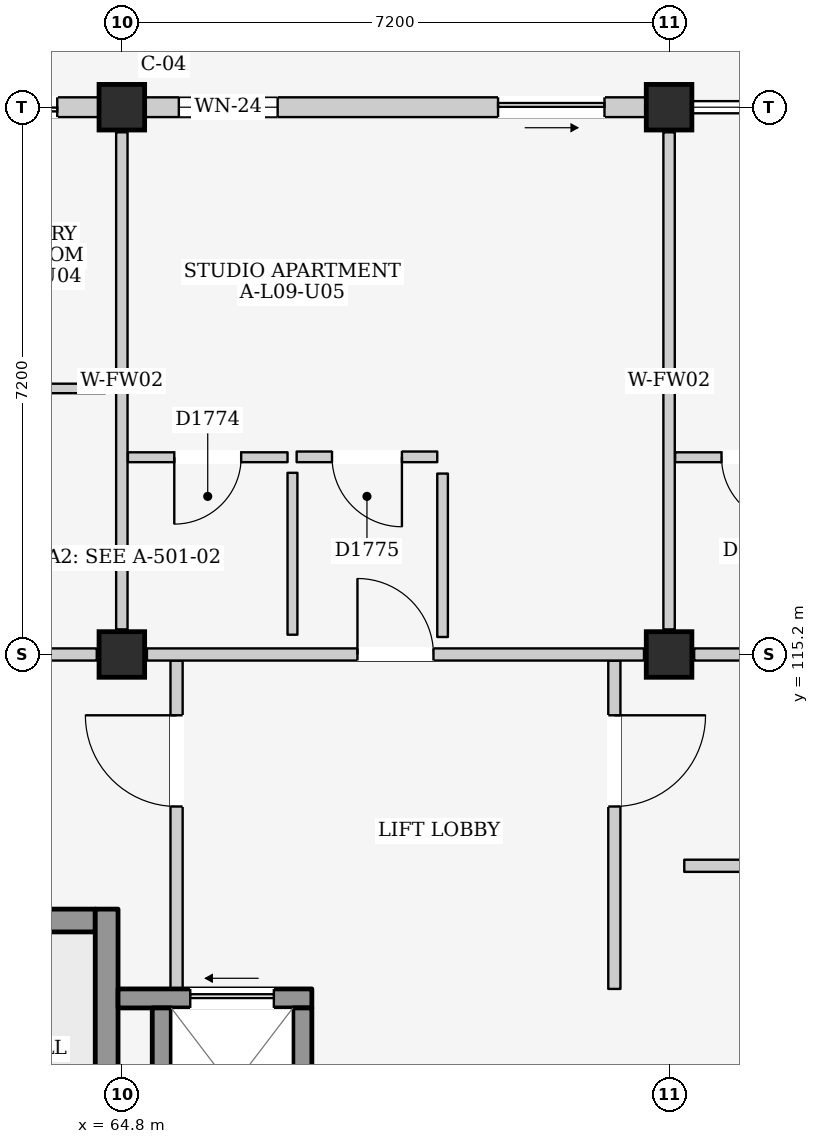
"""IFC4 building model, lengths in metres.
Left out: names, types, materials, properties, quantities, classifications, styles, units other than length and angle.
Written with IfcOpenShell. Run it as: python <this file> out.ifc"""

import sys

from ifc_helpers import new_model, si_unit, direction, frame, frame_2d, origin, origin_2d, place, context, subcontext, project, spatial, rectangle, extrude, element, fill, save


model = new_model("IFC4")
c1 = context("Model", 3, precision=1e-05, world=origin(), true_north=direction((0.0, 1.0)))
c2 = subcontext(c1, "Body", "Model", "MODEL_VIEW")
j1 = project(units=[si_unit("LENGTHUNIT", "METRE"), si_unit("PLANEANGLEUNIT", "RADIAN")], contexts=[c1])
p1 = place(None, origin())
s1 = spatial("IfcSite", under=j1, at=p1, CompositionType="ELEMENT")
p2 = place(p1, origin())
s2 = spatial("IfcBuilding", under=s1, at=p2, CompositionType="ELEMENT")
p3 = place(p2, frame((0.0, 0.0, 31.5)))
s3 = spatial("IfcBuildingStorey", under=s2, at=p3, CompositionType="ELEMENT", Elevation=31.5)
for number, where, z_axis, x_axis in (
    (1, (64.8, 115.2, 0.0), (0.0, 0.0, 1.0), (1.0, 0.0, 0.0)),
    (2, (64.8, 122.4, 0.0), (0.0, 0.0, 1.0), (1.0, 0.0, 0.0)),
    (3, (72.0, 115.2, 0.0), (0.0, 0.0, 1.0), (1.0, 0.0, 0.0)),
    (4, (72.0, 122.4, 0.0), (0.0, 0.0, 1.0), (1.0, 0.0, 0.0)),
):
    element("IfcColumn", number, at=place(p3, frame(where, z_axis=z_axis, x_axis=x_axis)), inside=s3, PredefinedType="COLUMN", context=c2, shape_type="SweptSolid", body=[
        extrude(rectangle(XDim=0.6, YDim=0.6, at=origin_2d()), origin(), (0.0, 0.0, 1.0), 3.3),
    ])
p4 = place(p3, frame((57.9, 122.4, 0.0), z_axis=(0.0, 0.0, 1.0), x_axis=(1.0, 0.0, 0.0)))
e5 = element("IfcWall", 5, at=p4, inside=s3, PredefinedType="ELEMENTEDWALL", context=c2, shape_type="SweptSolid", body=[
    extrude(rectangle(XDim=6.6, YDim=0.26, at=frame_2d((3.3, 0.0))), origin(), (0.0, 0.0, 1.0), 2.615),
])
p5 = place(p4, frame((4.05, 0.0, 0.0)))
e6 = element("IfcOpeningElement", 6, at=p5, cuts=e5, PredefinedType="OPENING", context=c2, shape_type="SweptSolid", body=[
    extrude(rectangle(XDim=2.0, YDim=2.12, at=frame_2d((1.0, 1.06))), frame((0.0, 0.145, 0.0), z_axis=(0.0, -1.0, 0.0), x_axis=(1.0, 0.0, 0.0)), (0.0, 0.0, 1.0), 0.29),
])
p6 = place(p4, frame((0.45, 0.0, 0.9)))
e7 = element("IfcOpeningElement", 7, at=p6, cuts=e5, PredefinedType="OPENING", context=c2, shape_type="SweptSolid", body=[
    extrude(rectangle(XDim=1.85, YDim=1.4, at=frame_2d((0.925, 0.7))), frame((0.0, 0.145, 0.0), z_axis=(0.0, -1.0, 0.0), x_axis=(1.0, 0.0, 0.0)), (0.0, 0.0, 1.0), 0.29),
])
p7 = place(p3, frame((65.1, 122.4, 0.0), z_axis=(0.0, 0.0, 1.0), x_axis=(1.0, 0.0, 0.0)))
e8 = element("IfcWall", 8, at=p7, inside=s3, PredefinedType="ELEMENTEDWALL", context=c2, shape_type="SweptSolid", body=[
    extrude(rectangle(XDim=6.6, YDim=0.26, at=frame_2d((3.3, 0.0))), origin(), (0.0, 0.0, 1.0), 2.615),
])
p8 = place(p7, frame((4.65, 0.0, 0.0)))
e9 = element("IfcOpeningElement", 9, at=p8, cuts=e8, PredefinedType="OPENING", context=c2, shape_type="SweptSolid", body=[
    extrude(rectangle(XDim=1.4, YDim=2.1, at=frame_2d((0.7, 1.05))), frame((0.0, 0.145, 0.0), z_axis=(0.0, -1.0, 0.0), x_axis=(1.0, 0.0, 0.0)), (0.0, 0.0, 1.0), 0.29),
])
p9 = place(p7, frame((0.45, 0.0, 0.9)))
e10 = element("IfcOpeningElement", 10, at=p9, cuts=e8, PredefinedType="OPENING", context=c2, shape_type="SweptSolid", body=[
    extrude(rectangle(XDim=1.3, YDim=1.25, at=frame_2d((0.65, 0.625))), frame((0.0, 0.145, 0.0), z_axis=(0.0, -1.0, 0.0), x_axis=(1.0, 0.0, 0.0)), (0.0, 0.0, 1.0), 0.29),
])
p10 = place(p3, frame((57.95, 111.7, 0.0), z_axis=(0.0, 0.0, 1.0), x_axis=(1.0, 0.0, 0.0)))
e11 = element("IfcWall", 11, at=p10, inside=s3, PredefinedType="SHEAR", context=c2, shape_type="SweptSolid", body=[
    extrude(rectangle(XDim=6.5, YDim=0.3, at=frame_2d((3.25, 0.0))), origin(), (0.0, 0.0, 1.0), 3.08),
])
p11 = place(p10, frame((0.18, 0.0, 0.0)))
e12 = element("IfcOpeningElement", 12, at=p11, cuts=e11, PredefinedType="OPENING", context=c2, shape_type="SweptSolid", body=[
    extrude(rectangle(XDim=1.15, YDim=2.2, at=frame_2d((0.575, 1.1))), frame((0.0, 0.165, 0.0), z_axis=(0.0, -1.0, 0.0), x_axis=(1.0, 0.0, 0.0)), (0.0, 0.0, 1.0), 0.33),
])
p12 = place(p3, frame((64.6, 108.15, 0.0), z_axis=(0.0, 0.0, 1.0), x_axis=(0.0, 1.0, 0.0)))
e13 = element("IfcWall", 13, at=p12, inside=s3, PredefinedType="SHEAR", context=c2, shape_type="SweptSolid", body=[
    extrude(rectangle(XDim=3.7, YDim=0.3, at=frame_2d((1.85, 0.0))), origin(), (0.0, 0.0, 1.0), 3.08),
])
p13 = place(p3, frame((65.52, 110.8, 0.0), z_axis=(0.0, 0.0, 1.0), x_axis=(0.0, 1.0, 0.0)))
e14 = element("IfcWall", 14, at=p13, inside=s3, PredefinedType="PARTITIONING", context=c2, shape_type="SweptSolid", body=[
    extrude(rectangle(XDim=4.32, YDim=0.16, at=frame_2d((2.16, 0.0))), origin(), (0.0, 0.0, 1.0), 3.08),
])
p14 = place(p13, frame((2.4, 0.0, 0.0)))
e15 = element("IfcOpeningElement", 15, at=p14, cuts=e14, PredefinedType="OPENING", context=c2, shape_type="SweptSolid", body=[
    extrude(rectangle(XDim=1.2, YDim=2.2, at=frame_2d((0.6, 1.1))), frame((0.0, 0.095, 0.0), z_axis=(0.0, -1.0, 0.0), x_axis=(1.0, 0.0, 0.0)), (0.0, 0.0, 1.0), 0.19),
])
p15 = place(p3, frame((71.28, 110.8, 0.0), z_axis=(0.0, 0.0, 1.0), x_axis=(0.0, 1.0, 0.0)))
e16 = element("IfcWall", 16, at=p15, inside=s3, PredefinedType="PARTITIONING", context=c2, shape_type="SweptSolid", body=[
    extrude(rectangle(XDim=4.32, YDim=0.16, at=frame_2d((2.16, 0.0))), origin(), (0.0, 0.0, 1.0), 3.08),
])
p16 = place(p15, frame((2.4, 0.0, 0.0)))
e17 = element("IfcOpeningElement", 17, at=p16, cuts=e16, PredefinedType="OPENING", context=c2, shape_type="SweptSolid", body=[
    extrude(rectangle(XDim=1.2, YDim=2.2, at=frame_2d((0.6, 1.1))), frame((0.0, 0.095, 0.0), z_axis=(0.0, -1.0, 0.0), x_axis=(1.0, 0.0, 0.0)), (0.0, 0.0, 1.0), 0.19),
])
p17 = place(p3, frame((64.75, 110.675, 0.0), z_axis=(0.0, 0.0, 1.0), x_axis=(1.0, 0.0, 0.0)))
e18 = element("IfcWall", 18, at=p17, inside=s3, PredefinedType="SHEAR", context=c2, shape_type="SweptSolid", body=[
    extrude(rectangle(XDim=2.55, YDim=0.25, at=frame_2d((1.275, 0.0))), origin(), (0.0, 0.0, 1.0), 3.08),
])
p18 = place(p17, frame((0.95, 0.0, 0.0)))
e19 = element("IfcOpeningElement", 19, at=p18, cuts=e18, PredefinedType="OPENING", context=c2, shape_type="SweptSolid", body=[
    extrude(rectangle(XDim=1.1, YDim=2.15, at=frame_2d((0.55, 1.075))), frame((0.0, 0.14, 0.0), z_axis=(0.0, -1.0, 0.0), x_axis=(1.0, 0.0, 0.0)), (0.0, 0.0, 1.0), 0.28),
])
for number, where, z_axis, x_axis in (
    (20, (65.325, 108.45, 0.0), (0.0, 0.0, 1.0), (0.0, 1.0, 0.0)),
    (21, (67.175, 108.45, 0.0), (0.0, 0.0, 1.0), (0.0, 1.0, 0.0)),
):
    element("IfcWall", number, at=place(p3, frame(where, z_axis=z_axis, x_axis=x_axis)), inside=s3, PredefinedType="SHEAR", context=c2, shape_type="SweptSolid", body=[
        extrude(rectangle(XDim=2.1, YDim=0.25, at=frame_2d((1.05, 0.0))), origin(), (0.0, 0.0, 1.0), 3.08),
    ])
p19 = place(p3, frame((57.93, 115.2, 0.0), z_axis=(0.0, 0.0, 1.0), x_axis=(1.0, 0.0, 0.0)))
e22 = element("IfcWall", 22, at=p19, inside=s3, PredefinedType="PARTITIONING", context=c2, shape_type="SweptSolid", body=[
    extrude(rectangle(XDim=6.54, YDim=0.16, at=frame_2d((3.27, 0.0))), origin(), (0.0, 0.0, 1.0), 2.415),
])
p20 = place(p19, frame((2.77, 0.0, 0.0)))
e23 = element("IfcOpeningElement", 23, at=p20, cuts=e22, PredefinedType="OPENING", context=c2, shape_type="SweptSolid", body=[
    extrude(rectangle(XDim=1.0, YDim=2.15, at=frame_2d((0.5, 1.075))), frame((0.0, 0.095, 0.0), z_axis=(0.0, -1.0, 0.0), x_axis=(1.0, 0.0, 0.0)), (0.0, 0.0, 1.0), 0.19),
])
p21 = place(p3, frame((64.8, 115.53, 0.0), z_axis=(0.0, 0.0, 1.0), x_axis=(0.0, 1.0, 0.0)))
e24 = element("IfcWall", 24, at=p21, inside=s3, PredefinedType="PARTITIONING", context=c2, shape_type="SweptSolid", body=[
    extrude(rectangle(XDim=6.54, YDim=0.15, at=frame_2d((3.27, 0.0))), origin(), (0.0, 0.0, 1.0), 2.565),
])
p22 = place(p3, frame((61.52, 118.7, 0.0), z_axis=(0.0, 0.0, 1.0), x_axis=(1.0, 0.0, 0.0)))
e25 = element("IfcWall", 25, at=p22, inside=s3, PredefinedType="PARTITIONING", context=c2, shape_type="SweptSolid", body=[
    extrude(rectangle(XDim=3.06, YDim=0.125, at=frame_2d((1.53, 0.0))), origin(), (0.0, 0.0, 1.0), 3.08),
])
p23 = place(p3, frame((65.13, 115.2, 0.0), z_axis=(0.0, 0.0, 1.0), x_axis=(1.0, 0.0, 0.0)))
e26 = element("IfcWall", 26, at=p23, inside=s3, PredefinedType="PARTITIONING", context=c2, shape_type="SweptSolid", body=[
    extrude(rectangle(XDim=6.54, YDim=0.16, at=frame_2d((3.27, 0.0))), origin(), (0.0, 0.0, 1.0), 2.415),
])
p24 = place(p23, frame((2.77, 0.0, 0.0)))
e27 = element("IfcOpeningElement", 27, at=p24, cuts=e26, PredefinedType="OPENING", context=c2, shape_type="SweptSolid", body=[
    extrude(rectangle(XDim=1.0, YDim=2.15, at=frame_2d((0.5, 1.075))), frame((0.0, 0.095, 0.0), z_axis=(0.0, -1.0, 0.0), x_axis=(1.0, 0.0, 0.0)), (0.0, 0.0, 1.0), 0.19),
])
p25 = place(p3, frame((72.0, 115.53, 0.0), z_axis=(0.0, 0.0, 1.0), x_axis=(0.0, 1.0, 0.0)))
e28 = element("IfcWall", 28, at=p25, inside=s3, PredefinedType="PARTITIONING", context=c2, shape_type="SweptSolid", body=[
    extrude(rectangle(XDim=6.54, YDim=0.15, at=frame_2d((3.27, 0.0))), origin(), (0.0, 0.0, 1.0), 2.565),
])
p26 = place(p3, frame((64.88, 117.795, 0.0), z_axis=(0.0, 0.0, 1.0), x_axis=(1.0, 0.0, 0.0)))
e29 = element("IfcWall", 29, at=p26, inside=s3, PredefinedType="PARTITIONING", context=c2, shape_type="SweptSolid", body=[
    extrude(rectangle(XDim=2.1, YDim=0.13, at=frame_2d((1.05, 0.0))), origin(), (0.0, 0.0, 1.0), 3.08),
])
p27 = place(p26, frame((0.61, 0.0, 0.0)))
e30 = element("IfcOpeningElement", 30, at=p27, cuts=e29, PredefinedType="OPENING", context=c2, shape_type="SweptSolid", body=[
    extrude(rectangle(XDim=0.88, YDim=2.1, at=frame_2d((0.44, 1.05))), frame((0.0, 0.08, 0.0), z_axis=(0.0, -1.0, 0.0), x_axis=(1.0, 0.0, 0.0)), (0.0, 0.0, 1.0), 0.16),
])
p28 = place(p3, frame((67.045, 115.46, 0.0), z_axis=(0.0, 0.0, 1.0), x_axis=(0.0, 1.0, 0.0)))
e31 = element("IfcWall", 31, at=p28, inside=s3, PredefinedType="PARTITIONING", context=c2, shape_type="SweptSolid", body=[
    extrude(rectangle(XDim=2.13, YDim=0.13, at=frame_2d((1.065, 0.0))), origin(), (0.0, 0.0, 1.0), 3.08),
])
p29 = place(p3, frame((67.1, 117.8, 0.0), z_axis=(0.0, 0.0, 1.0), x_axis=(1.0, 0.0, 0.0)))
e32 = element("IfcWall", 32, at=p29, inside=s3, PredefinedType="PARTITIONING", context=c2, shape_type="SweptSolid", body=[
    extrude(rectangle(XDim=1.85, YDim=0.14, at=frame_2d((0.925, 0.0))), origin(), (0.0, 0.0, 1.0), 3.08),
])
p30 = place(p29, frame((0.465, 0.0, 0.0)))
e33 = element("IfcOpeningElement", 33, at=p30, cuts=e32, PredefinedType="OPENING", context=c2, shape_type="SweptSolid", body=[
    extrude(rectangle(XDim=0.92, YDim=2.1, at=frame_2d((0.46, 1.05))), frame((0.0, 0.085, 0.0), z_axis=(0.0, -1.0, 0.0), x_axis=(1.0, 0.0, 0.0)), (0.0, 0.0, 1.0), 0.17),
])
p31 = place(p3, frame((69.02, 115.43, 0.0), z_axis=(0.0, 0.0, 1.0), x_axis=(0.0, 1.0, 0.0)))
e34 = element("IfcWall", 34, at=p31, inside=s3, PredefinedType="PARTITIONING", context=c2, shape_type="SweptSolid", body=[
    extrude(rectangle(XDim=2.15, YDim=0.14, at=frame_2d((1.075, 0.0))), origin(), (0.0, 0.0, 1.0), 3.08),
])
p32 = place(p3, frame((72.33, 115.2, 0.0), z_axis=(0.0, 0.0, 1.0), x_axis=(1.0, 0.0, 0.0)))
e35 = element("IfcWall", 35, at=p32, inside=s3, PredefinedType="PARTITIONING", context=c2, shape_type="SweptSolid", body=[
    extrude(rectangle(XDim=6.54, YDim=0.16, at=frame_2d((3.27, 0.0))), origin(), (0.0, 0.0, 1.0), 2.415),
])
p33 = place(p32, frame((2.77, 0.0, 0.0)))
e36 = element("IfcOpeningElement", 36, at=p33, cuts=e35, PredefinedType="OPENING", context=c2, shape_type="SweptSolid", body=[
    extrude(rectangle(XDim=1.0, YDim=2.15, at=frame_2d((0.5, 1.075))), frame((0.0, 0.095, 0.0), z_axis=(0.0, -1.0, 0.0), x_axis=(1.0, 0.0, 0.0)), (0.0, 0.0, 1.0), 0.19),
])
p34 = place(p3, frame((72.08, 117.795, 0.0), z_axis=(0.0, 0.0, 1.0), x_axis=(1.0, 0.0, 0.0)))
e37 = element("IfcWall", 37, at=p34, inside=s3, PredefinedType="PARTITIONING", context=c2, shape_type="SweptSolid", body=[
    extrude(rectangle(XDim=2.1, YDim=0.13, at=frame_2d((1.05, 0.0))), origin(), (0.0, 0.0, 1.0), 3.08),
])
p35 = place(p34, frame((0.61, 0.0, 0.0)))
e38 = element("IfcOpeningElement", 38, at=p35, cuts=e37, PredefinedType="OPENING", context=c2, shape_type="SweptSolid", body=[
    extrude(rectangle(XDim=0.88, YDim=2.1, at=frame_2d((0.44, 1.05))), frame((0.0, 0.08, 0.0), z_axis=(0.0, -1.0, 0.0), x_axis=(1.0, 0.0, 0.0)), (0.0, 0.0, 1.0), 0.16),
])
p36 = place(p3, frame((72.2, 112.42, 0.0), z_axis=(0.0, 0.0, 1.0), x_axis=(1.0, 0.0, 0.0)))
e39 = element("IfcWall", 39, at=p36, inside=s3, PredefinedType="PARTITIONING", context=c2, shape_type="SweptSolid", body=[
    extrude(rectangle(XDim=6.8, YDim=0.16, at=frame_2d((3.4, 0.0))), origin(), (0.0, 0.0, 1.0), 3.08),
])
p37 = place(p36, frame((2.93, 0.0, 0.0)))
e40 = element("IfcOpeningElement", 40, at=p37, cuts=e39, PredefinedType="OPENING", context=c2, shape_type="SweptSolid", body=[
    extrude(rectangle(XDim=0.94, YDim=2.12, at=frame_2d((0.47, 1.06))), frame((0.0, 0.095, 0.0), z_axis=(0.0, -1.0, 0.0), x_axis=(1.0, 0.0, 0.0)), (0.0, 0.0, 1.0), 0.19),
])
p38 = place(p5, frame((2.0, 0.0, 0.0), z_axis=(0.0, 0.0, 1.0), x_axis=(-1.0, 0.0, 0.0)))
e41 = element("IfcDoor", 41, at=p38, inside=s3, OperationType="DOUBLE_DOOR_SLIDING", PredefinedType="DOOR", context=c2, shape_type="SweptSolid", body=[
    extrude(rectangle(XDim=2.0, YDim=2.12, at=frame_2d((1.0, 1.06))), frame((0.0, 0.025, 0.0), z_axis=(0.0, -1.0, 0.0), x_axis=(1.0, 0.0, 0.0)), (0.0, 0.0, 1.0), 0.05),
])
fill(e6, e41)
p39 = place(p8, frame((1.4, 0.0, 0.0), z_axis=(0.0, 0.0, 1.0), x_axis=(-1.0, 0.0, 0.0)))
e42 = element("IfcDoor", 42, at=p39, inside=s3, OperationType="SLIDING_TO_RIGHT", PredefinedType="DOOR", context=c2, shape_type="SweptSolid", body=[
    extrude(rectangle(XDim=1.4, YDim=2.1, at=frame_2d((0.7, 1.05))), frame((0.0, 0.025, 0.0), z_axis=(0.0, -1.0, 0.0), x_axis=(1.0, 0.0, 0.0)), (0.0, 0.0, 1.0), 0.05),
])
fill(e9, e42)
p40 = place(p9, origin())
e43 = element("IfcWindow", 43, at=p40, inside=s3, PartitioningType="SINGLE_PANEL", PredefinedType="WINDOW", context=c2, shape_type="SweptSolid", body=[
    extrude(rectangle(XDim=1.3, YDim=1.25, at=frame_2d((0.65, 0.625))), frame((0.0, 0.03, 0.0), z_axis=(0.0, -1.0, 0.0), x_axis=(1.0, 0.0, 0.0)), (0.0, 0.0, 1.0), 0.06),
])
fill(e10, e43)
p41 = place(p14, origin())
e44 = element("IfcDoor", 44, at=p41, inside=s3, OperationType="SINGLE_SWING_RIGHT", PredefinedType="DOOR", context=c2, shape_type="SweptSolid", body=[
    extrude(rectangle(XDim=1.2, YDim=2.2, at=frame_2d((0.6, 1.1))), frame((0.0, 0.025, 0.0), z_axis=(0.0, -1.0, 0.0), x_axis=(1.0, 0.0, 0.0)), (0.0, 0.0, 1.0), 0.05),
])
fill(e15, e44)
p42 = place(p16, frame((1.2, 0.0, 0.0), z_axis=(0.0, 0.0, 1.0), x_axis=(-1.0, 0.0, 0.0)))
e45 = element("IfcDoor", 45, at=p42, inside=s3, OperationType="SINGLE_SWING_LEFT", PredefinedType="DOOR", context=c2, shape_type="SweptSolid", body=[
    extrude(rectangle(XDim=1.2, YDim=2.2, at=frame_2d((0.6, 1.1))), frame((0.0, 0.025, 0.0), z_axis=(0.0, -1.0, 0.0), x_axis=(1.0, 0.0, 0.0)), (0.0, 0.0, 1.0), 0.05),
])
fill(e17, e45)
p43 = place(p18, origin())
e46 = element("IfcDoor", 46, at=p43, inside=s3, OperationType="SLIDING_TO_LEFT", PredefinedType="DOOR", context=c2, shape_type="SweptSolid", body=[
    extrude(rectangle(XDim=1.1, YDim=2.15, at=frame_2d((0.55, 1.075))), frame((0.0, 0.025, 0.0), z_axis=(0.0, -1.0, 0.0), x_axis=(1.0, 0.0, 0.0)), (0.0, 0.0, 1.0), 0.05),
])
fill(e19, e46)
p44 = place(p24, origin())
e47 = element("IfcDoor", 47, at=p44, inside=s3, OperationType="SINGLE_SWING_LEFT", PredefinedType="DOOR", context=c2, shape_type="SweptSolid", body=[
    extrude(rectangle(XDim=1.0, YDim=2.15, at=frame_2d((0.5, 1.075))), frame((0.0, 0.025, 0.0), z_axis=(0.0, -1.0, 0.0), x_axis=(1.0, 0.0, 0.0)), (0.0, 0.0, 1.0), 0.05),
])
fill(e27, e47)
p45 = place(p27, frame((0.88, 0.0, 0.0), z_axis=(0.0, 0.0, 1.0), x_axis=(-1.0, 0.0, 0.0)))
e48 = element("IfcDoor", 48, at=p45, inside=s3, OperationType="SINGLE_SWING_RIGHT", PredefinedType="DOOR", context=c2, shape_type="SweptSolid", body=[
    extrude(rectangle(XDim=0.88, YDim=2.1, at=frame_2d((0.44, 1.05))), frame((0.0, 0.025, 0.0), z_axis=(0.0, -1.0, 0.0), x_axis=(1.0, 0.0, 0.0)), (0.0, 0.0, 1.0), 0.05),
])
fill(e30, e48)
p46 = place(p30, frame((0.92, 0.0, 0.0), z_axis=(0.0, 0.0, 1.0), x_axis=(-1.0, 0.0, 0.0)))
e49 = element("IfcDoor", 49, at=p46, inside=s3, OperationType="SINGLE_SWING_LEFT", PredefinedType="DOOR", context=c2, shape_type="SweptSolid", body=[
    extrude(rectangle(XDim=0.92, YDim=2.1, at=frame_2d((0.46, 1.05))), frame((0.0, 0.025, 0.0), z_axis=(0.0, -1.0, 0.0), x_axis=(1.0, 0.0, 0.0)), (0.0, 0.0, 1.0), 0.05),
])
fill(e33, e49)
p47 = place(p35, frame((0.88, 0.0, 0.0), z_axis=(0.0, 0.0, 1.0), x_axis=(-1.0, 0.0, 0.0)))
e50 = element("IfcDoor", 50, at=p47, inside=s3, OperationType="SINGLE_SWING_LEFT", PredefinedType="DOOR", context=c2, shape_type="SweptSolid", body=[
    extrude(rectangle(XDim=0.88, YDim=2.1, at=frame_2d((0.44, 1.05))), frame((0.0, 0.025, 0.0), z_axis=(0.0, -1.0, 0.0), x_axis=(1.0, 0.0, 0.0)), (0.0, 0.0, 1.0), 0.05),
])
fill(e38, e50)
save(model, sys.argv[1])
